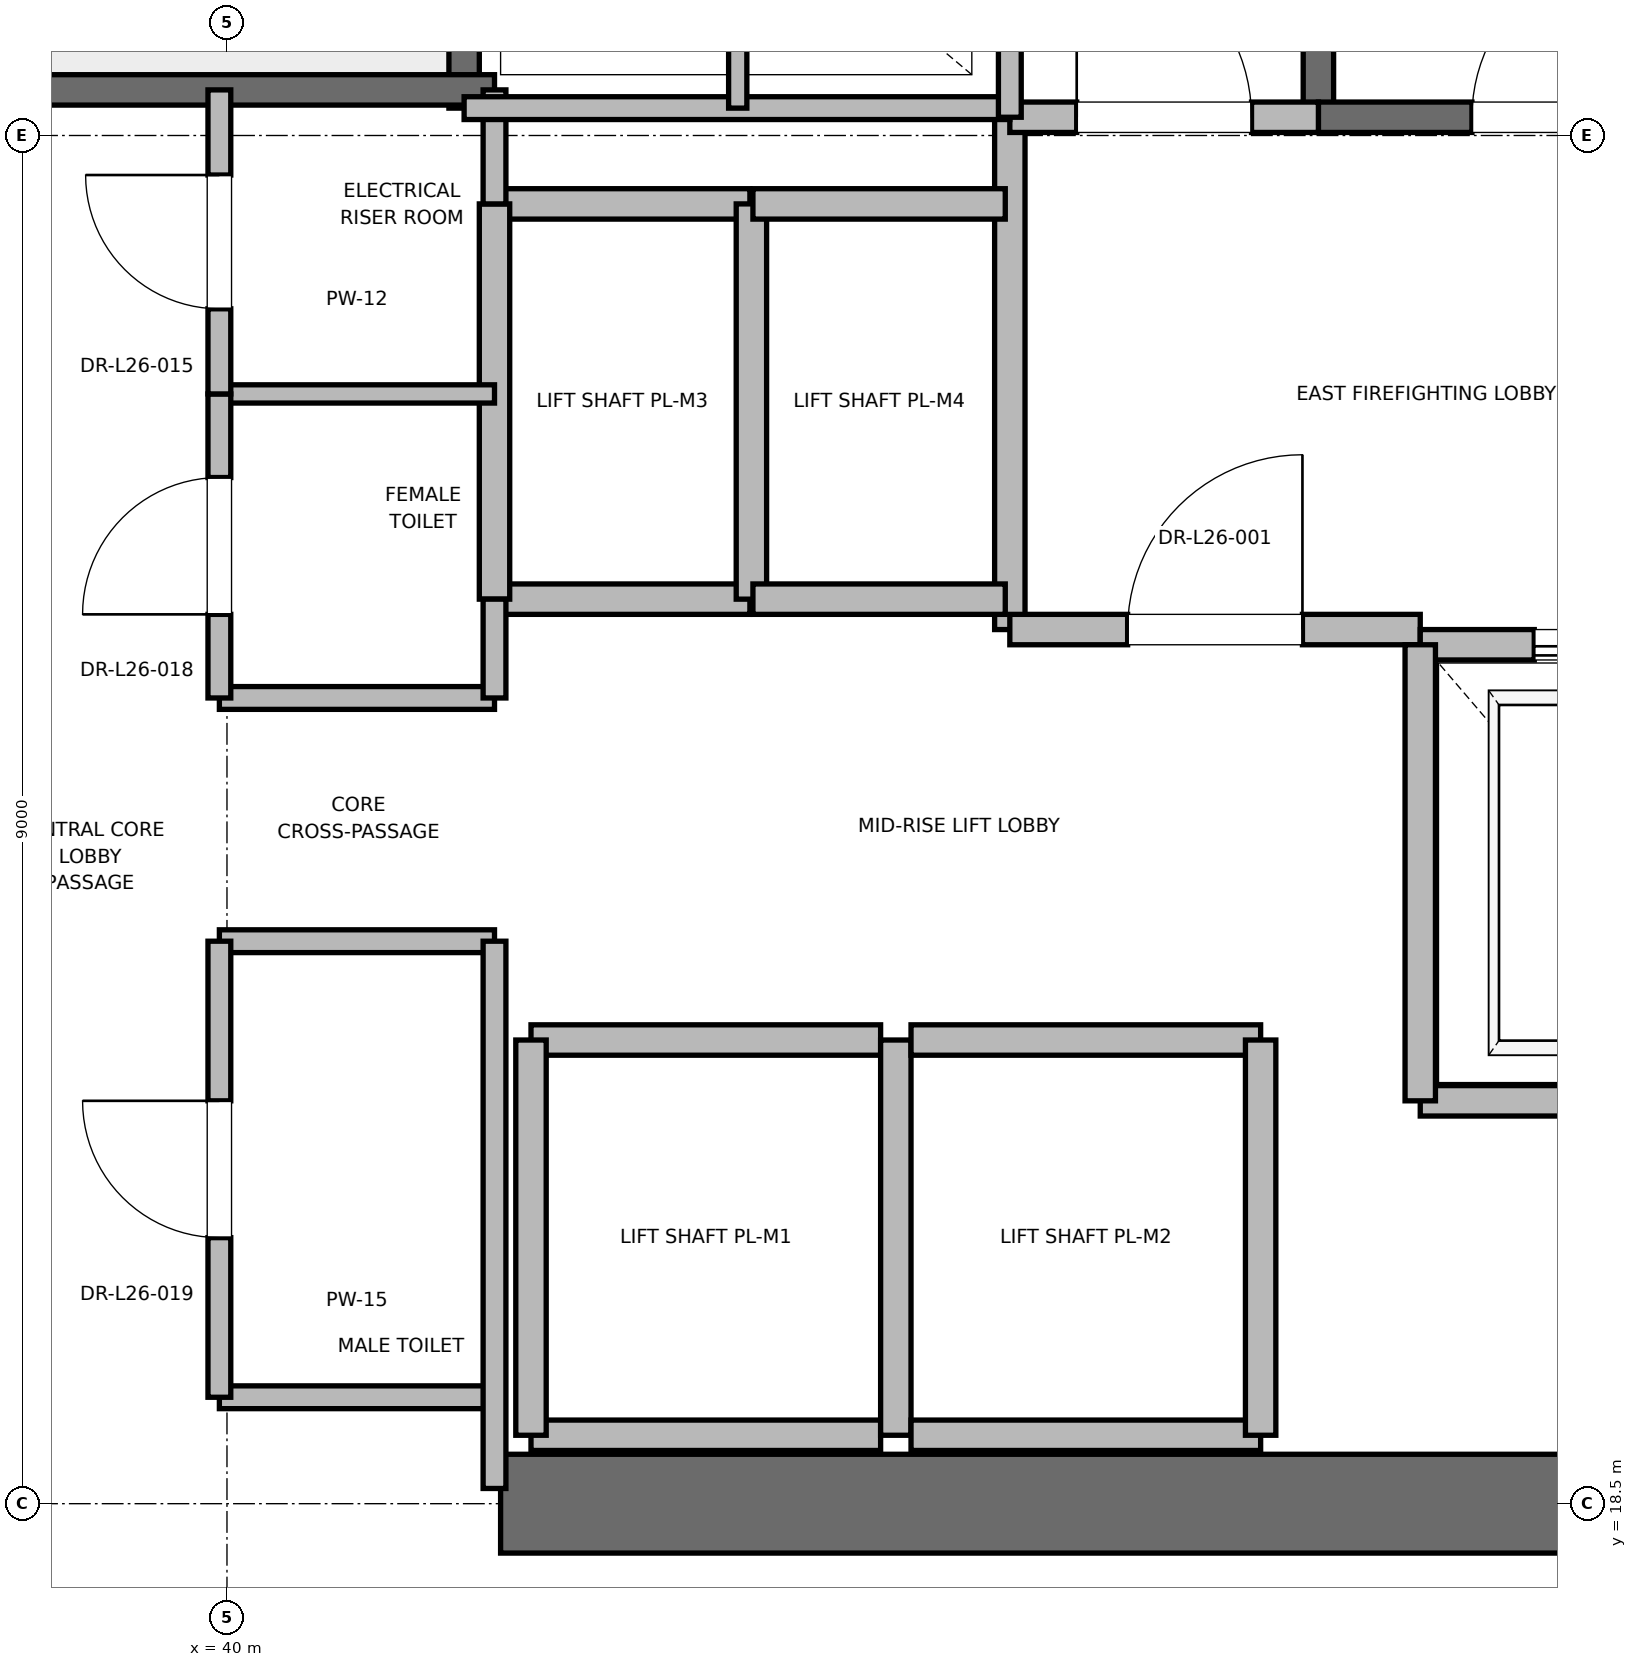
"""IFC4 building model, lengths in metres.
Left out: names, types, materials, properties, quantities, classifications, styles, units other than length and angle.
Written with IfcOpenShell. Run it as: python <this file> out.ifc"""

import sys

from ifc_helpers import new_model, si_unit, direction, frame, frame_2d, origin, place, context, subcontext, project, spatial, rectangle, extrude, element, fill, save


model = new_model("IFC4")
c1 = context("Model", 3, precision=1e-05, world=origin(), true_north=direction((0.0, 1.0)))
c2 = subcontext(c1, "Body", "Model", "MODEL_VIEW")
j1 = project(units=[si_unit("LENGTHUNIT", "METRE"), si_unit("PLANEANGLEUNIT", "RADIAN")], contexts=[c1])
p1 = place(None, origin())
s1 = spatial("IfcSite", under=j1, at=p1, CompositionType="ELEMENT")
p2 = place(p1, origin())
s2 = spatial("IfcBuilding", under=s1, at=p2, CompositionType="ELEMENT")
p3 = place(p2, frame((0.0, 0.0, 113.0)))
s3 = spatial("IfcBuildingStorey", under=s2, at=p3, CompositionType="ELEMENT", Elevation=113.0)
p4 = place(p3, frame((41.8, 18.5, 0.0), z_axis=(0.0, 0.0, 1.0), x_axis=(1.0, 0.0, 0.0)))
e1 = element("IfcWall", 1, at=p4, inside=s3, PredefinedType="SHEAR", context=c2, shape_type="SweptSolid", body=[
    extrude(rectangle(XDim=9.2, YDim=0.65, at=frame_2d((4.6, 0.0))), origin(), (0.0, 0.0, 1.0), 5.1),
])
p5 = place(p3, frame((47.18, 27.62, 0.0), z_axis=(0.0, 0.0, 1.0), x_axis=(0.0, 1.0, 0.0)))
e2 = element("IfcWall", 2, at=p5, inside=s3, PredefinedType="SOLIDWALL", context=c2, shape_type="SweptSolid", body=[
    extrude(rectangle(XDim=8.18, YDim=0.2, at=frame_2d((4.09, 0.0))), origin(), (0.0, 0.0, 1.0), 5.1),
])
p6 = place(p3, frame((47.18, 27.62, 0.0), z_axis=(0.0, 0.0, 1.0), x_axis=(1.0, 0.0, 0.0)))
e3 = element("IfcWall", 3, at=p6, inside=s3, PredefinedType="SOLIDWALL", context=c2, shape_type="SweptSolid", body=[
    extrude(rectangle(XDim=3.12, YDim=0.2, at=frame_2d((1.56, 0.0))), origin(), (0.0, 0.0, 1.0), 5.1),
])
p7 = place(p6, frame((1.01, 0.0, 0.0)))
e4 = element("IfcOpeningElement", 4, at=p7, cuts=e3, PredefinedType="OPENING", context=c2, shape_type="SweptSolid", body=[
    extrude(rectangle(XDim=1.1, YDim=2.15, at=frame_2d((0.55, 1.075))), frame((0.0, 0.1, 0.0), z_axis=(0.0, -1.0, 0.0), x_axis=(1.0, 0.0, 0.0)), (0.0, 0.0, 1.0), 0.2),
])
p8 = place(p3, frame((41.56, 27.68, 0.0), z_axis=(0.0, 0.0, 1.0), x_axis=(0.0, 1.0, 0.0)))
e5 = element("IfcWall", 5, at=p8, inside=s3, PredefinedType="SOLIDWALL", context=c2, shape_type="SweptSolid", body=[
    extrude(rectangle(XDim=8.57, YDim=0.2, at=frame_2d((4.285, 0.0))), origin(), (0.0, 0.0, 1.0), 5.1),
])
p9 = place(p3, frame((38.44, 27.8, 0.0), z_axis=(0.0, 0.0, 1.0), x_axis=(1.0, 0.0, 0.0)))
e6 = element("IfcWall", 6, at=p9, inside=s3, PredefinedType="SOLIDWALL", context=c2, shape_type="SweptSolid", body=[
    extrude(rectangle(XDim=3.32, YDim=0.2, at=frame_2d((1.66, 0.0))), origin(), (0.0, 0.0, 1.0), 5.1),
])
p10 = place(p3, frame((45.15, 24.25, 0.0), z_axis=(0.0, 0.0, 1.0), x_axis=(0.0, 1.0, 0.0)))
e7 = element("IfcWall", 7, at=p10, inside=s3, PredefinedType="PARTITIONING", context=c2, shape_type="SweptSolid", body=[
    extrude(rectangle(XDim=3.37, YDim=0.2, at=frame_2d((1.685, 0.0))), origin(), (0.0, 0.0, 1.0), 5.1),
])
p11 = place(p3, frame((45.15, 24.25, 0.0), z_axis=(0.0, 0.0, 1.0), x_axis=(1.0, 0.0, 0.0)))
e8 = element("IfcWall", 8, at=p11, inside=s3, PredefinedType="PARTITIONING", context=c2, shape_type="SweptSolid", body=[
    extrude(rectangle(XDim=2.7, YDim=0.2, at=frame_2d((1.35, 0.0))), origin(), (0.0, 0.0, 1.0), 5.1),
])
p12 = place(p11, frame((0.775, 0.0, 0.0)))
e9 = element("IfcOpeningElement", 9, at=p12, cuts=e8, PredefinedType="OPENING", context=c2, shape_type="SweptSolid", body=[
    extrude(rectangle(XDim=1.15, YDim=2.2, at=frame_2d((0.575, 1.1))), frame((0.0, 0.1, 0.0), z_axis=(0.0, -1.0, 0.0), x_axis=(1.0, 0.0, 0.0)), (0.0, 0.0, 1.0), 0.2),
])
p13 = place(p3, frame((45.15, 27.62, 0.0), z_axis=(0.0, 0.0, 1.0), x_axis=(1.0, 0.0, 0.0)))
e10 = element("IfcWall", 10, at=p13, inside=s3, PredefinedType="PARTITIONING", context=c2, shape_type="SweptSolid", body=[
    extrude(rectangle(XDim=2.03, YDim=0.2, at=frame_2d((1.015, 0.0))), origin(), (0.0, 0.0, 1.0), 5.1),
])
p14 = place(p13, frame((0.44, 0.0, 0.0)))
e11 = element("IfcOpeningElement", 11, at=p14, cuts=e10, PredefinedType="OPENING", context=c2, shape_type="SweptSolid", body=[
    extrude(rectangle(XDim=1.15, YDim=2.2, at=frame_2d((0.575, 1.1))), frame((0.0, 0.1, 0.0), z_axis=(0.0, -1.0, 0.0), x_axis=(1.0, 0.0, 0.0)), (0.0, 0.0, 1.0), 0.2),
])
p15 = place(p3, frame((47.85, 21.15, 0.0), z_axis=(0.0, 0.0, 1.0), x_axis=(1.0, 0.0, 0.0)))
e12 = element("IfcWall", 12, at=p15, inside=s3, PredefinedType="SOLIDWALL", context=c2, shape_type="SweptSolid", body=[
    extrude(rectangle(XDim=2.6, YDim=0.2, at=frame_2d((1.3, 0.0))), origin(), (0.0, 0.0, 1.0), 5.1),
])
p16 = place(p3, frame((50.45, 24.15, 0.0), z_axis=(0.0, 0.0, 1.0), x_axis=(-1.0, 0.0, 0.0)))
e13 = element("IfcWall", 13, at=p16, inside=s3, PredefinedType="SOLIDWALL", context=c2, shape_type="SweptSolid", body=[
    extrude(rectangle(XDim=2.6, YDim=0.2, at=frame_2d((1.3, 0.0))), origin(), (0.0, 0.0, 1.0), 3.88),
])
p17 = place(p16, frame((0.75, 0.0, 0.0)))
e14 = element("IfcOpeningElement", 14, at=p17, cuts=e13, PredefinedType="OPENING", context=c2, shape_type="SweptSolid", body=[
    extrude(rectangle(XDim=1.1, YDim=2.2, at=frame_2d((0.55, 1.1))), frame((0.0, 0.1, 0.0), z_axis=(0.0, -1.0, 0.0), x_axis=(1.0, 0.0, 0.0)), (0.0, 0.0, 1.0), 0.2),
])
p18 = place(p3, frame((47.85, 24.15, 0.0), z_axis=(0.0, 0.0, 1.0), x_axis=(0.0, -1.0, 0.0)))
e15 = element("IfcWall", 15, at=p18, inside=s3, PredefinedType="SOLIDWALL", context=c2, shape_type="SweptSolid", body=[
    extrude(rectangle(XDim=3.0, YDim=0.2, at=frame_2d((1.5, 0.0))), origin(), (0.0, 0.0, 1.0), 5.1),
])
p19 = place(p3, frame((42.0, 18.95, 0.0), z_axis=(0.0, 0.0, 1.0), x_axis=(1.0, 0.0, 0.0)))
e16 = element("IfcWall", 16, at=p19, inside=s3, PredefinedType="SOLIDWALL", context=c2, shape_type="SweptSolid", body=[
    extrude(rectangle(XDim=2.3, YDim=0.2, at=frame_2d((1.15, 0.0))), origin(), (0.0, 0.0, 1.0), 3.88),
])
p20 = place(p3, frame((44.3, 21.55, 0.0), z_axis=(0.0, 0.0, 1.0), x_axis=(-1.0, 0.0, 0.0)))
e17 = element("IfcWall", 17, at=p20, inside=s3, PredefinedType="SOLIDWALL", context=c2, shape_type="SweptSolid", body=[
    extrude(rectangle(XDim=2.3, YDim=0.2, at=frame_2d((1.15, 0.0))), origin(), (0.0, 0.0, 1.0), 5.1),
])
p21 = place(p3, frame((42.0, 21.55, 0.0), z_axis=(0.0, 0.0, 1.0), x_axis=(0.0, -1.0, 0.0)))
e18 = element("IfcWall", 18, at=p21, inside=s3, PredefinedType="SOLIDWALL", context=c2, shape_type="SweptSolid", body=[
    extrude(rectangle(XDim=2.6, YDim=0.2, at=frame_2d((1.3, 0.0))), origin(), (0.0, 0.0, 1.0), 3.88),
])
p22 = place(p3, frame((44.4, 18.95, 0.0), z_axis=(0.0, 0.0, 1.0), x_axis=(0.0, 1.0, 0.0)))
e19 = element("IfcWall", 19, at=p22, inside=s3, PredefinedType="SOLIDWALL", context=c2, shape_type="SweptSolid", body=[
    extrude(rectangle(XDim=2.6, YDim=0.2, at=frame_2d((1.3, 0.0))), origin(), (0.0, 0.0, 1.0), 5.1),
])
for number, where, z_axis, x_axis in (
    (20, (44.5, 18.95, 0.0), (0.0, 0.0, 1.0), (1.0, 0.0, 0.0)),
    (21, (46.8, 21.55, 0.0), (0.0, 0.0, 1.0), (-1.0, 0.0, 0.0)),
):
    element("IfcWall", number, at=place(p3, frame(where, z_axis=z_axis, x_axis=x_axis)), inside=s3, PredefinedType="SOLIDWALL", context=c2, shape_type="SweptSolid", body=[
        extrude(rectangle(XDim=2.3, YDim=0.2, at=frame_2d((1.15, 0.0))), origin(), (0.0, 0.0, 1.0), 5.1),
    ])
p23 = place(p3, frame((46.8, 18.95, 0.0), z_axis=(0.0, 0.0, 1.0), x_axis=(0.0, 1.0, 0.0)))
e22 = element("IfcWall", 22, at=p23, inside=s3, PredefinedType="SOLIDWALL", context=c2, shape_type="SweptSolid", body=[
    extrude(rectangle(XDim=2.6, YDim=0.2, at=frame_2d((1.3, 0.0))), origin(), (0.0, 0.0, 1.0), 5.1),
])
for number, where, z_axis, x_axis in (
    (23, (41.76, 24.45, 0.0), (0.0, 0.0, 1.0), (1.0, 0.0, 0.0)),
    (24, (43.44, 27.05, 0.0), (0.0, 0.0, 1.0), (-1.0, 0.0, 0.0)),
):
    element("IfcWall", number, at=place(p3, frame(where, z_axis=z_axis, x_axis=x_axis)), inside=s3, PredefinedType="SOLIDWALL", context=c2, shape_type="SweptSolid", body=[
        extrude(rectangle(XDim=1.68, YDim=0.2, at=frame_2d((0.84, 0.0))), origin(), (0.0, 0.0, 1.0), 5.1),
    ])
for number, where, z_axis, x_axis in (
    (25, (41.76, 27.05, 0.0), (0.0, 0.0, 1.0), (0.0, -1.0, 0.0)),
    (26, (43.45, 24.45, 0.0), (0.0, 0.0, 1.0), (0.0, 1.0, 0.0)),
):
    element("IfcWall", number, at=place(p3, frame(where, z_axis=z_axis, x_axis=x_axis)), inside=s3, PredefinedType="SOLIDWALL", context=c2, shape_type="SweptSolid", body=[
        extrude(rectangle(XDim=2.6, YDim=0.2, at=frame_2d((1.3, 0.0))), origin(), (0.0, 0.0, 1.0), 5.1),
    ])
for number, where, z_axis, x_axis in (
    (27, (43.46, 24.45, 0.0), (0.0, 0.0, 1.0), (1.0, 0.0, 0.0)),
    (28, (45.12, 27.05, 0.0), (0.0, 0.0, 1.0), (-1.0, 0.0, 0.0)),
):
    element("IfcWall", number, at=place(p3, frame(where, z_axis=z_axis, x_axis=x_axis)), inside=s3, PredefinedType="SOLIDWALL", context=c2, shape_type="SweptSolid", body=[
        extrude(rectangle(XDim=1.66, YDim=0.2, at=frame_2d((0.83, 0.0))), origin(), (0.0, 0.0, 1.0), 5.1),
    ])
for number, where, z_axis, x_axis in (
    (29, (39.95, 19.2, 0.0), (0.0, 0.0, 1.0), (1.0, 0.0, 0.0)),
    (30, (39.95, 22.2, 0.0), (0.0, 0.0, 1.0), (1.0, 0.0, 0.0)),
    (31, (39.95, 23.8, 0.0), (0.0, 0.0, 1.0), (1.0, 0.0, 0.0)),
):
    element("IfcWall", number, at=place(p3, frame(where, z_axis=z_axis, x_axis=x_axis)), inside=s3, PredefinedType="PARTITIONING", context=c2, shape_type="SweptSolid", body=[
        extrude(rectangle(XDim=1.81, YDim=0.15, at=frame_2d((0.905, 0.0))), origin(), (0.0, 0.0, 1.0), 2.85),
    ])
p24 = place(p3, frame((39.95, 25.8, 0.0), z_axis=(0.0, 0.0, 1.0), x_axis=(1.0, 0.0, 0.0)))
e32 = element("IfcWall", 32, at=p24, inside=s3, PredefinedType="PARTITIONING", context=c2, shape_type="SweptSolid", body=[
    extrude(rectangle(XDim=1.81, YDim=0.12, at=frame_2d((0.905, 0.0))), origin(), (0.0, 0.0, 1.0), 2.85),
])
p25 = place(p3, frame((41.76, 18.6, 0.0), z_axis=(0.0, 0.0, 1.0), x_axis=(0.0, 1.0, 0.0)))
e33 = element("IfcWall", 33, at=p25, inside=s3, PredefinedType="PARTITIONING", context=c2, shape_type="SweptSolid", body=[
    extrude(rectangle(XDim=3.6, YDim=0.15, at=frame_2d((1.8, 0.0))), origin(), (0.0, 0.0, 1.0), 2.85),
])
p26 = place(p3, frame((41.76, 23.8, 0.0), z_axis=(0.0, 0.0, 1.0), x_axis=(0.0, 1.0, 0.0)))
e34 = element("IfcWall", 34, at=p26, inside=s3, PredefinedType="PARTITIONING", context=c2, shape_type="SweptSolid", body=[
    extrude(rectangle(XDim=0.65, YDim=0.15, at=frame_2d((0.325, 0.0))), origin(), (0.0, 0.0, 1.0), 2.85),
])
p27 = place(p3, frame((41.76, 27.05, 0.0), z_axis=(0.0, 0.0, 1.0), x_axis=(0.0, 1.0, 0.0)))
e35 = element("IfcWall", 35, at=p27, inside=s3, PredefinedType="PARTITIONING", context=c2, shape_type="SweptSolid", body=[
    extrude(rectangle(XDim=0.75, YDim=0.15, at=frame_2d((0.375, 0.0))), origin(), (0.0, 0.0, 1.0), 2.85),
])
p28 = place(p3, frame((39.95, 19.2, 0.0), z_axis=(0.0, 0.0, 1.0), x_axis=(0.0, 1.0, 0.0)))
e36 = element("IfcWall", 36, at=p28, inside=s3, PredefinedType="PARTITIONING", context=c2, shape_type="SweptSolid", body=[
    extrude(rectangle(XDim=3.0, YDim=0.15, at=frame_2d((1.5, 0.0))), origin(), (0.0, 0.0, 1.0), 2.85),
])
p29 = place(p28, frame((1.05, 0.0, 0.0)))
e37 = element("IfcOpeningElement", 37, at=p29, cuts=e36, PredefinedType="OPENING", context=c2, shape_type="SweptSolid", body=[
    extrude(rectangle(XDim=0.9, YDim=2.1, at=frame_2d((0.45, 1.05))), frame((0.0, 0.075, 0.0), z_axis=(0.0, -1.0, 0.0), x_axis=(1.0, 0.0, 0.0)), (0.0, 0.0, 1.0), 0.15),
])
p30 = place(p3, frame((39.95, 23.8, 0.0), z_axis=(0.0, 0.0, 1.0), x_axis=(0.0, 1.0, 0.0)))
e38 = element("IfcWall", 38, at=p30, inside=s3, PredefinedType="PARTITIONING", context=c2, shape_type="SweptSolid", body=[
    extrude(rectangle(XDim=2.0, YDim=0.15, at=frame_2d((1.0, 0.0))), origin(), (0.0, 0.0, 1.0), 2.85),
])
p31 = place(p30, frame((0.55, 0.0, 0.0)))
e39 = element("IfcOpeningElement", 39, at=p31, cuts=e38, PredefinedType="OPENING", context=c2, shape_type="SweptSolid", body=[
    extrude(rectangle(XDim=0.9, YDim=2.1, at=frame_2d((0.45, 1.05))), frame((0.0, 0.075, 0.0), z_axis=(0.0, -1.0, 0.0), x_axis=(1.0, 0.0, 0.0)), (0.0, 0.0, 1.0), 0.15),
])
p32 = place(p3, frame((39.95, 25.8, 0.0), z_axis=(0.0, 0.0, 1.0), x_axis=(0.0, 1.0, 0.0)))
e40 = element("IfcWall", 40, at=p32, inside=s3, PredefinedType="PARTITIONING", context=c2, shape_type="SweptSolid", body=[
    extrude(rectangle(XDim=2.0, YDim=0.15, at=frame_2d((1.0, 0.0))), origin(), (0.0, 0.0, 1.0), 2.85),
])
p33 = place(p32, frame((0.56, 0.0, 0.0)))
e41 = element("IfcOpeningElement", 41, at=p33, cuts=e40, PredefinedType="OPENING", context=c2, shape_type="SweptSolid", body=[
    extrude(rectangle(XDim=0.88, YDim=2.1, at=frame_2d((0.44, 1.05))), frame((0.0, 0.075, 0.0), z_axis=(0.0, -1.0, 0.0), x_axis=(1.0, 0.0, 0.0)), (0.0, 0.0, 1.0), 0.15),
])
p34 = place(p3, frame((41.56, 27.68, 0.0), z_axis=(0.0, 0.0, 1.0), x_axis=(1.0, 0.0, 0.0)))
e42 = element("IfcWall", 42, at=p34, inside=s3, PredefinedType="PARTITIONING", context=c2, shape_type="SweptSolid", body=[
    extrude(rectangle(XDim=3.59, YDim=0.15, at=frame_2d((1.795, 0.0))), origin(), (0.0, 0.0, 1.0), 2.85),
])
p35 = place(p3, frame((45.15, 27.62, 0.0), z_axis=(0.0, 0.0, 1.0), x_axis=(0.0, 1.0, 0.0)))
e43 = element("IfcWall", 43, at=p35, inside=s3, PredefinedType="PARTITIONING", context=c2, shape_type="SweptSolid", body=[
    extrude(rectangle(XDim=3.1, YDim=0.15, at=frame_2d((1.55, 0.0))), origin(), (0.0, 0.0, 1.0), 2.85),
])
p36 = place(p3, frame((43.36, 27.68, 0.0), z_axis=(0.0, 0.0, 1.0), x_axis=(0.0, 1.0, 0.0)))
e44 = element("IfcWall", 44, at=p36, inside=s3, PredefinedType="PARTITIONING", context=c2, shape_type="SweptSolid", body=[
    extrude(rectangle(XDim=3.04, YDim=0.12, at=frame_2d((1.52, 0.0))), origin(), (0.0, 0.0, 1.0), 2.85),
])
p37 = place(p7, origin())
e45 = element("IfcDoor", 45, at=p37, inside=s3, OperationType="SINGLE_SWING_RIGHT", PredefinedType="DOOR", context=c2, shape_type="SweptSolid", body=[
    extrude(rectangle(XDim=1.1, YDim=2.15, at=frame_2d((0.55, 1.075))), frame((0.0, 0.025, 0.0), z_axis=(0.0, -1.0, 0.0), x_axis=(1.0, 0.0, 0.0)), (0.0, 0.0, 1.0), 0.05),
])
fill(e4, e45)
p38 = place(p12, origin())
e46 = element("IfcDoor", 46, at=p38, inside=s3, OperationType="SINGLE_SWING_RIGHT", PredefinedType="DOOR", context=c2, shape_type="SweptSolid", body=[
    extrude(rectangle(XDim=1.15, YDim=2.2, at=frame_2d((0.575, 1.1))), frame((0.0, 0.025, 0.0), z_axis=(0.0, -1.0, 0.0), x_axis=(1.0, 0.0, 0.0)), (0.0, 0.0, 1.0), 0.05),
])
fill(e9, e46)
p39 = place(p14, origin())
e47 = element("IfcDoor", 47, at=p39, inside=s3, OperationType="SINGLE_SWING_LEFT", PredefinedType="DOOR", context=c2, shape_type="SweptSolid", body=[
    extrude(rectangle(XDim=1.15, YDim=2.2, at=frame_2d((0.575, 1.1))), frame((0.0, 0.025, 0.0), z_axis=(0.0, -1.0, 0.0), x_axis=(1.0, 0.0, 0.0)), (0.0, 0.0, 1.0), 0.05),
])
fill(e11, e47)
p40 = place(p17, origin())
e48 = element("IfcDoor", 48, at=p40, inside=s3, OperationType="SLIDING_TO_RIGHT", PredefinedType="DOOR", context=c2, shape_type="SweptSolid", body=[
    extrude(rectangle(XDim=1.1, YDim=2.2, at=frame_2d((0.55, 1.1))), frame((0.0, 0.025, 0.0), z_axis=(0.0, -1.0, 0.0), x_axis=(1.0, 0.0, 0.0)), (0.0, 0.0, 1.0), 0.05),
])
fill(e14, e48)
p41 = place(p29, origin())
e49 = element("IfcDoor", 49, at=p41, inside=s3, OperationType="SINGLE_SWING_RIGHT", PredefinedType="DOOR", context=c2, shape_type="SweptSolid", body=[
    extrude(rectangle(XDim=0.9, YDim=2.1, at=frame_2d((0.45, 1.05))), frame((0.0, 0.025, 0.0), z_axis=(0.0, -1.0, 0.0), x_axis=(1.0, 0.0, 0.0)), (0.0, 0.0, 1.0), 0.05),
])
fill(e37, e49)
p42 = place(p31, origin())
e50 = element("IfcDoor", 50, at=p42, inside=s3, OperationType="SINGLE_SWING_LEFT", PredefinedType="DOOR", context=c2, shape_type="SweptSolid", body=[
    extrude(rectangle(XDim=0.9, YDim=2.1, at=frame_2d((0.45, 1.05))), frame((0.0, 0.025, 0.0), z_axis=(0.0, -1.0, 0.0), x_axis=(1.0, 0.0, 0.0)), (0.0, 0.0, 1.0), 0.05),
])
fill(e39, e50)
p43 = place(p33, origin())
e51 = element("IfcDoor", 51, at=p43, inside=s3, OperationType="SINGLE_SWING_RIGHT", PredefinedType="DOOR", context=c2, shape_type="SweptSolid", body=[
    extrude(rectangle(XDim=0.88, YDim=2.1, at=frame_2d((0.44, 1.05))), frame((0.0, 0.025, 0.0), z_axis=(0.0, -1.0, 0.0), x_axis=(1.0, 0.0, 0.0)), (0.0, 0.0, 1.0), 0.05),
])
fill(e41, e51)
save(model, sys.argv[1])
